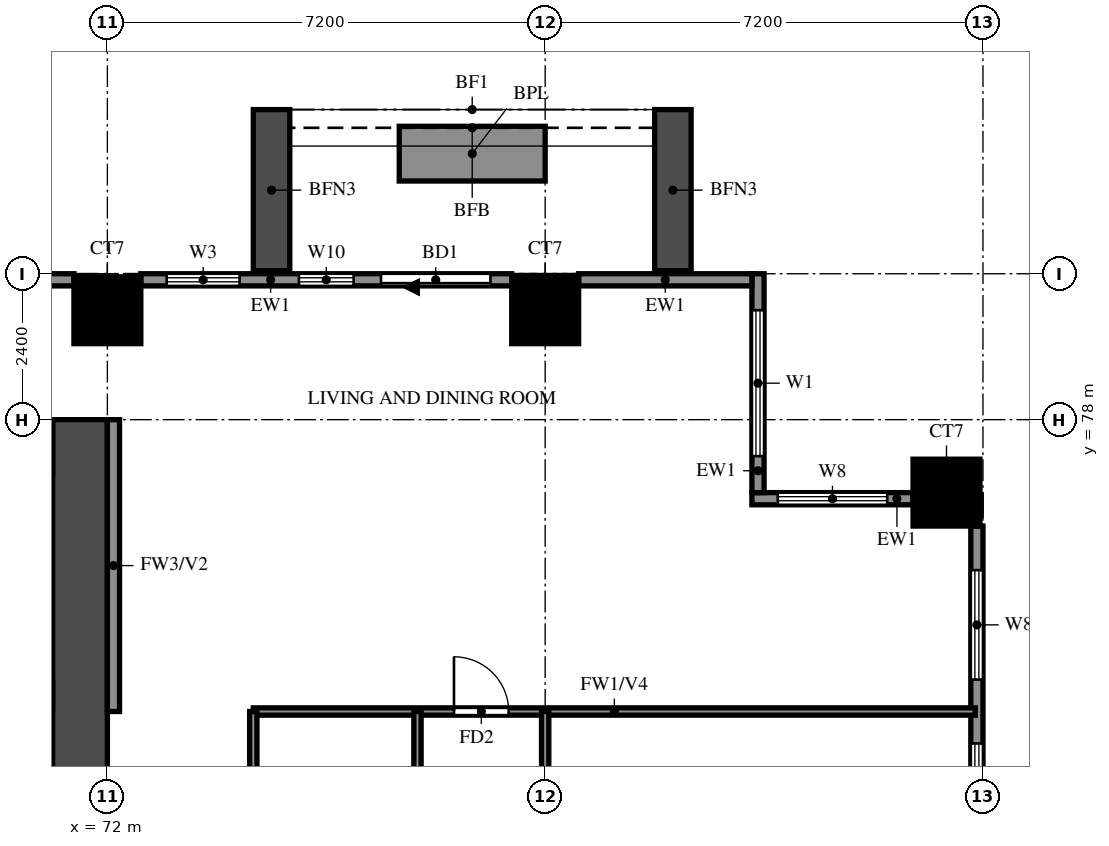
"""IFC4 building model, lengths in metres.
Left out: names, types, materials, properties, quantities, classifications, styles, units other than length and angle.
Written with IfcOpenShell. Run it as: python <this file> out.ifc"""

import sys

from ifc_helpers import new_model, si_unit, direction, frame, frame_2d, origin, origin_2d, place, context, subcontext, project, spatial, rectangle, extrude, source, transform, mapped, element, fill, save


model = new_model("IFC4")
c1 = context("Model", 3, precision=1e-05, world=origin(), true_north=direction((0.0, 1.0)))
c2 = subcontext(c1, "Body", "Model", "MODEL_VIEW")
j1 = project(units=[si_unit("LENGTHUNIT", "METRE"), si_unit("PLANEANGLEUNIT", "RADIAN")], contexts=[c1])
p1 = place(None, origin())
s1 = spatial("IfcSite", under=j1, at=p1, CompositionType="ELEMENT")
p2 = place(p1, origin())
s2 = spatial("IfcBuilding", under=s1, at=p2, CompositionType="ELEMENT")
p3 = place(p2, frame((0.0, 0.0, 41.0)))
s3 = spatial("IfcBuildingStorey", under=s2, at=p3, CompositionType="ELEMENT", Elevation=41.0)
m1 = source(origin(), c2, "Body", "SweptSolid", [
    extrude(rectangle(XDim=1.1, YDim=1.1, at=origin_2d()), origin(), (0.0, 0.0, 1.0), 3.18),
])
for number, where, z_axis, x_axis in (
    (1, (85.8, 76.8, 0.0), (0.0, 0.0, 1.0), (1.0, 0.0, 0.0)),
    (2, (72.0, 79.8, 0.0), (0.0, 0.0, 1.0), (1.0, 0.0, 0.0)),
    (3, (79.2, 79.8, 0.0), (0.0, 0.0, 1.0), (1.0, 0.0, 0.0)),
):
    element("IfcColumn", number, at=place(p3, frame(where, z_axis=z_axis, x_axis=x_axis)), inside=s3, PredefinedType="COLUMN", context=c2, shape_type="MappedRepresentation", body=[
        mapped(m1, transform((0.0, 0.0, 0.0))),
    ])
p4 = place(p3, frame((71.55, 66.0, 0.0), z_axis=(0.0, 0.0, 1.0), x_axis=(0.0, 1.0, 0.0)))
e4 = element("IfcWall", 4, at=p4, inside=s3, PredefinedType="SHEAR", context=c2, shape_type="SweptSolid", body=[
    extrude(rectangle(XDim=12.0, YDim=0.9, at=frame_2d((6.0, 0.0))), origin(), (0.0, 0.0, 1.0), 3.18),
])
p5 = place(p3, frame((29.7, 77.55, 0.0), z_axis=(0.0, 0.0, 1.0), x_axis=(1.0, 0.0, 0.0)))
e5 = element("IfcWall", 5, at=p5, inside=s3, PredefinedType="SHEAR", context=c2, shape_type="SweptSolid", body=[
    extrude(rectangle(XDim=41.4, YDim=0.9, at=frame_2d((20.7, 0.0))), origin(), (0.0, 0.0, 1.0), 3.18),
])
p6 = place(p3, frame((86.3, 70.15, 0.0), z_axis=(0.0, 0.0, 1.0), x_axis=(0.0, 1.0, 0.0)))
e6 = element("IfcWall", 6, at=p6, inside=s3, PredefinedType="SOLIDWALL", context=c2, shape_type="SweptSolid", body=[
    extrude(rectangle(XDim=6.1, YDim=0.2, at=frame_2d((3.05, 0.0))), origin(), (0.0, 0.0, 1.0), 3.18),
])
p7 = place(p6, frame((0.725, 0.0, 0.6)))
e7 = element("IfcOpeningElement", 7, at=p7, cuts=e6, PredefinedType="OPENING", context=c2, shape_type="SweptSolid", body=[
    extrude(rectangle(XDim=1.8, YDim=2.4, at=frame_2d((0.9, 1.2))), frame((0.0, 0.11, 0.0), z_axis=(0.0, -1.0, 0.0), x_axis=(1.0, 0.0, 0.0)), (0.0, 0.0, 1.0), 0.22),
])
p8 = place(p6, frame((3.575, 0.0, 0.6)))
e8 = element("IfcOpeningElement", 8, at=p8, cuts=e6, PredefinedType="OPENING", context=c2, shape_type="SweptSolid", body=[
    extrude(rectangle(XDim=1.8, YDim=2.4, at=frame_2d((0.9, 1.2))), frame((0.0, 0.11, 0.0), z_axis=(0.0, -1.0, 0.0), x_axis=(1.0, 0.0, 0.0)), (0.0, 0.0, 1.0), 0.22),
])
p9 = place(p3, frame((85.25, 76.7, 0.0), z_axis=(0.0, 0.0, 1.0), x_axis=(-1.0, 0.0, 0.0)))
e9 = element("IfcWall", 9, at=p9, inside=s3, PredefinedType="SOLIDWALL", context=c2, shape_type="SweptSolid", body=[
    extrude(rectangle(XDim=2.65, YDim=0.2, at=frame_2d((1.325, 0.0))), origin(), (0.0, 0.0, 1.0), 3.18),
])
p10 = place(p9, frame((0.425, 0.0, 0.6)))
e10 = element("IfcOpeningElement", 10, at=p10, cuts=e9, PredefinedType="OPENING", context=c2, shape_type="SweptSolid", body=[
    extrude(rectangle(XDim=1.8, YDim=2.4, at=frame_2d((0.9, 1.2))), frame((0.0, 0.11, 0.0), z_axis=(0.0, -1.0, 0.0), x_axis=(1.0, 0.0, 0.0)), (0.0, 0.0, 1.0), 0.22),
])
p11 = place(p3, frame((82.7, 76.8, 0.0), z_axis=(0.0, 0.0, 1.0), x_axis=(0.0, 1.0, 0.0)))
e11 = element("IfcWall", 11, at=p11, inside=s3, PredefinedType="SOLIDWALL", context=c2, shape_type="SweptSolid", body=[
    extrude(rectangle(XDim=3.6, YDim=0.2, at=frame_2d((1.8, 0.0))), origin(), (0.0, 0.0, 1.0), 3.18),
])
p12 = place(p11, frame((0.6, 0.0, 0.6)))
e12 = element("IfcOpeningElement", 12, at=p12, cuts=e11, PredefinedType="OPENING", context=c2, shape_type="SweptSolid", body=[
    extrude(rectangle(XDim=2.4, YDim=2.4, at=frame_2d((1.2, 1.2))), frame((0.0, 0.11, 0.0), z_axis=(0.0, -1.0, 0.0), x_axis=(1.0, 0.0, 0.0)), (0.0, 0.0, 1.0), 0.22),
])
p13 = place(p3, frame((82.6, 80.3, 0.0), z_axis=(0.0, 0.0, 1.0), x_axis=(-1.0, 0.0, 0.0)))
e13 = element("IfcWall", 13, at=p13, inside=s3, PredefinedType="SOLIDWALL", context=c2, shape_type="SweptSolid", body=[
    extrude(rectangle(XDim=2.85, YDim=0.2, at=frame_2d((1.425, 0.0))), origin(), (0.0, 0.0, 1.0), 3.18),
])
p14 = place(p3, frame((78.65, 80.3, 0.0), z_axis=(0.0, 0.0, 1.0), x_axis=(-1.0, 0.0, 0.0)))
e14 = element("IfcWall", 14, at=p14, inside=s3, PredefinedType="SOLIDWALL", context=c2, shape_type="SweptSolid", body=[
    extrude(rectangle(XDim=6.1, YDim=0.2, at=frame_2d((3.05, 0.0))), origin(), (0.0, 0.0, 1.0), 3.18),
])
p15 = place(p14, frame((0.35, 0.0, 0.0)))
e15 = element("IfcOpeningElement", 15, at=p15, cuts=e14, PredefinedType="OPENING", context=c2, shape_type="SweptSolid", body=[
    extrude(rectangle(XDim=1.8, YDim=2.4, at=frame_2d((0.9, 1.2))), frame((0.0, 0.11, 0.0), z_axis=(0.0, -1.0, 0.0), x_axis=(1.0, 0.0, 0.0)), (0.0, 0.0, 1.0), 0.22),
])
p16 = place(p14, frame((2.6, 0.0, 0.6)))
e16 = element("IfcOpeningElement", 16, at=p16, cuts=e14, PredefinedType="OPENING", context=c2, shape_type="SweptSolid", body=[
    extrude(rectangle(XDim=0.9, YDim=2.4, at=frame_2d((0.45, 1.2))), frame((0.0, 0.11, 0.0), z_axis=(0.0, -1.0, 0.0), x_axis=(1.0, 0.0, 0.0)), (0.0, 0.0, 1.0), 0.22),
])
p17 = place(p14, frame((4.475, 0.0, 0.6)))
e17 = element("IfcOpeningElement", 17, at=p17, cuts=e14, PredefinedType="OPENING", context=c2, shape_type="SweptSolid", body=[
    extrude(rectangle(XDim=1.2, YDim=2.4, at=frame_2d((0.6, 1.2))), frame((0.0, 0.11, 0.0), z_axis=(0.0, -1.0, 0.0), x_axis=(1.0, 0.0, 0.0)), (0.0, 0.0, 1.0), 0.22),
])
p18 = place(p3, frame((71.45, 80.3, 0.0), z_axis=(0.0, 0.0, 1.0), x_axis=(-1.0, 0.0, 0.0)))
e18 = element("IfcWall", 18, at=p18, inside=s3, PredefinedType="SOLIDWALL", context=c2, shape_type="SweptSolid", body=[
    extrude(rectangle(XDim=6.1, YDim=0.2, at=frame_2d((3.05, 0.0))), origin(), (0.0, 0.0, 1.0), 3.18),
])
for number, where, z_axis, x_axis in (
    (19, (81.3, 80.45, 0.0), (0.0, 0.0, 1.0), (0.0, 1.0, 0.0)),
    (20, (74.7, 80.45, 0.0), (0.0, 0.0, 1.0), (0.0, 1.0, 0.0)),
):
    element("IfcWall", number, at=place(p3, frame(where, z_axis=z_axis, x_axis=x_axis)), inside=s3, PredefinedType="SOLIDWALL", context=c2, shape_type="SweptSolid", body=[
        extrude(rectangle(XDim=2.65, YDim=0.6, at=frame_2d((1.325, 0.0))), origin(), (0.0, 0.0, 1.0), 2.85),
    ])
p19 = place(p3, frame((79.2, 82.375, 0.0), z_axis=(0.0, 0.0, 1.0), x_axis=(-1.0, 0.0, 0.0)))
e21 = element("IfcWall", 21, at=p19, inside=s3, PredefinedType="SOLIDWALL", context=c2, shape_type="SweptSolid", body=[
    extrude(rectangle(XDim=2.4, YDim=0.9, at=frame_2d((1.2, 0.0))), origin(), (0.0, 0.0, 1.0), 0.9),
])
p20 = place(p3, frame((72.1, 73.2, 0.0), z_axis=(0.0, 0.0, 1.0), x_axis=(0.0, 1.0, 0.0)))
e22 = element("IfcWall", 22, at=p20, inside=s3, PredefinedType="SOLIDWALL", context=c2, shape_type="SweptSolid", body=[
    extrude(rectangle(XDim=4.8, YDim=0.2, at=frame_2d((2.4, 0.0))), origin(), (0.0, 0.0, 1.0), 3.18),
])
p21 = place(p3, frame((74.4, 73.2, 0.0), z_axis=(0.0, 0.0, 1.0), x_axis=(1.0, 0.0, 0.0)))
e23 = element("IfcWall", 23, at=p21, inside=s3, PredefinedType="PARTITIONING", context=c2, shape_type="SweptSolid", body=[
    extrude(rectangle(XDim=11.875, YDim=0.12, at=frame_2d((5.938, 0.0))), origin(), (0.0, 0.0, 1.0), 2.28),
])
p22 = place(p21, frame((3.3, 0.0, 0.0)))
e24 = element("IfcOpeningElement", 24, at=p22, cuts=e23, PredefinedType="OPENING", context=c2, shape_type="SweptSolid", body=[
    extrude(rectangle(XDim=0.9, YDim=2.1, at=frame_2d((0.45, 1.05))), frame((0.0, 0.07, 0.0), z_axis=(0.0, -1.0, 0.0), x_axis=(1.0, 0.0, 0.0)), (0.0, 0.0, 1.0), 0.14),
])
p23 = place(p3, frame((74.4, 69.62, 0.0), z_axis=(0.0, 0.0, 1.0), x_axis=(0.0, 1.0, 0.0)))
e25 = element("IfcWall", 25, at=p23, inside=s3, PredefinedType="PARTITIONING", context=c2, shape_type="SweptSolid", body=[
    extrude(rectangle(XDim=3.58, YDim=0.12, at=frame_2d((1.79, 0.0))), origin(), (0.0, 0.0, 1.0), 3.18),
])
p24 = place(p3, frame((77.1, 64.8, 0.0), z_axis=(0.0, 0.0, 1.0), x_axis=(0.0, 1.0, 0.0)))
e26 = element("IfcWall", 26, at=p24, inside=s3, PredefinedType="PARTITIONING", context=c2, shape_type="SweptSolid", body=[
    extrude(rectangle(XDim=8.4, YDim=0.12, at=frame_2d((4.2, 0.0))), origin(), (0.0, 0.0, 1.0), 3.18),
])
p25 = place(p24, frame((1.875, 0.0, 0.0)))
e27 = element("IfcOpeningElement", 27, at=p25, cuts=e26, PredefinedType="OPENING", context=c2, shape_type="SweptSolid", body=[
    extrude(rectangle(XDim=0.9, YDim=2.1, at=frame_2d((0.45, 1.05))), frame((0.0, 0.07, 0.0), z_axis=(0.0, -1.0, 0.0), x_axis=(1.0, 0.0, 0.0)), (0.0, 0.0, 1.0), 0.14),
])
p26 = place(p24, frame((6.125, 0.0, 0.0)))
e28 = element("IfcOpeningElement", 28, at=p26, cuts=e26, PredefinedType="OPENING", context=c2, shape_type="SweptSolid", body=[
    extrude(rectangle(XDim=0.8, YDim=2.1, at=frame_2d((0.4, 1.05))), frame((0.0, 0.07, 0.0), z_axis=(0.0, -1.0, 0.0), x_axis=(1.0, 0.0, 0.0)), (0.0, 0.0, 1.0), 0.14),
])
p27 = place(p3, frame((79.2, 69.6, 0.0), z_axis=(0.0, 0.0, 1.0), x_axis=(0.0, 1.0, 0.0)))
e29 = element("IfcWall", 29, at=p27, inside=s3, PredefinedType="PARTITIONING", context=c2, shape_type="SweptSolid", body=[
    extrude(rectangle(XDim=3.6, YDim=0.12, at=frame_2d((1.8, 0.0))), origin(), (0.0, 0.0, 1.0), 3.18),
])
p28 = place(p27, frame((1.35, 0.0, 0.0)))
e30 = element("IfcOpeningElement", 30, at=p28, cuts=e29, PredefinedType="OPENING", context=c2, shape_type="SweptSolid", body=[
    extrude(rectangle(XDim=0.9, YDim=2.1, at=frame_2d((0.45, 1.05))), frame((0.0, 0.07, 0.0), z_axis=(0.0, -1.0, 0.0), x_axis=(1.0, 0.0, 0.0)), (0.0, 0.0, 1.0), 0.14),
])
p29 = place(p7, origin())
e31 = element("IfcWindow", 31, at=p29, inside=s3, PartitioningType="DOUBLE_PANEL_VERTICAL", PredefinedType="WINDOW", context=c2, shape_type="SweptSolid", body=[
    extrude(rectangle(XDim=1.8, YDim=2.4, at=frame_2d((0.9, 1.2))), frame((0.0, 0.03, 0.0), z_axis=(0.0, -1.0, 0.0), x_axis=(1.0, 0.0, 0.0)), (0.0, 0.0, 1.0), 0.06),
])
fill(e7, e31)
p30 = place(p8, origin())
e32 = element("IfcWindow", 32, at=p30, inside=s3, PartitioningType="DOUBLE_PANEL_VERTICAL", PredefinedType="WINDOW", context=c2, shape_type="SweptSolid", body=[
    extrude(rectangle(XDim=1.8, YDim=2.4, at=frame_2d((0.9, 1.2))), frame((0.0, 0.03, 0.0), z_axis=(0.0, -1.0, 0.0), x_axis=(1.0, 0.0, 0.0)), (0.0, 0.0, 1.0), 0.06),
])
fill(e8, e32)
p31 = place(p10, origin())
e33 = element("IfcWindow", 33, at=p31, inside=s3, PartitioningType="DOUBLE_PANEL_VERTICAL", PredefinedType="WINDOW", context=c2, shape_type="SweptSolid", body=[
    extrude(rectangle(XDim=1.8, YDim=2.4, at=frame_2d((0.9, 1.2))), frame((0.0, 0.03, 0.0), z_axis=(0.0, -1.0, 0.0), x_axis=(1.0, 0.0, 0.0)), (0.0, 0.0, 1.0), 0.06),
])
fill(e10, e33)
p32 = place(p12, origin())
e34 = element("IfcWindow", 34, at=p32, inside=s3, PartitioningType="DOUBLE_PANEL_VERTICAL", PredefinedType="WINDOW", context=c2, shape_type="SweptSolid", body=[
    extrude(rectangle(XDim=2.4, YDim=2.4, at=frame_2d((1.2, 1.2))), frame((0.0, 0.03, 0.0), z_axis=(0.0, -1.0, 0.0), x_axis=(1.0, 0.0, 0.0)), (0.0, 0.0, 1.0), 0.06),
])
fill(e12, e34)
p33 = place(p15, origin())
e35 = element("IfcDoor", 35, at=p33, inside=s3, OperationType="DOUBLE_DOOR_SLIDING", PredefinedType="DOOR", context=c2, shape_type="SweptSolid", body=[
    extrude(rectangle(XDim=1.8, YDim=2.4, at=frame_2d((0.9, 1.2))), frame((0.0, 0.025, 0.0), z_axis=(0.0, -1.0, 0.0), x_axis=(1.0, 0.0, 0.0)), (0.0, 0.0, 1.0), 0.05),
])
fill(e15, e35)
p34 = place(p16, origin())
e36 = element("IfcWindow", 36, at=p34, inside=s3, PartitioningType="SINGLE_PANEL", PredefinedType="WINDOW", context=c2, shape_type="SweptSolid", body=[
    extrude(rectangle(XDim=0.9, YDim=2.4, at=frame_2d((0.45, 1.2))), frame((0.0, 0.03, 0.0), z_axis=(0.0, -1.0, 0.0), x_axis=(1.0, 0.0, 0.0)), (0.0, 0.0, 1.0), 0.06),
])
fill(e16, e36)
p35 = place(p17, origin())
e37 = element("IfcWindow", 37, at=p35, inside=s3, PartitioningType="SINGLE_PANEL", PredefinedType="WINDOW", context=c2, shape_type="SweptSolid", body=[
    extrude(rectangle(XDim=1.2, YDim=2.4, at=frame_2d((0.6, 1.2))), frame((0.0, 0.03, 0.0), z_axis=(0.0, -1.0, 0.0), x_axis=(1.0, 0.0, 0.0)), (0.0, 0.0, 1.0), 0.06),
])
fill(e17, e37)
p36 = place(p22, origin())
e38 = element("IfcDoor", 38, at=p36, inside=s3, OperationType="SINGLE_SWING_LEFT", PredefinedType="DOOR", context=c2, shape_type="SweptSolid", body=[
    extrude(rectangle(XDim=0.9, YDim=2.1, at=frame_2d((0.45, 1.05))), frame((0.0, 0.025, 0.0), z_axis=(0.0, -1.0, 0.0), x_axis=(1.0, 0.0, 0.0)), (0.0, 0.0, 1.0), 0.05),
])
fill(e24, e38)
save(model, sys.argv[1])
